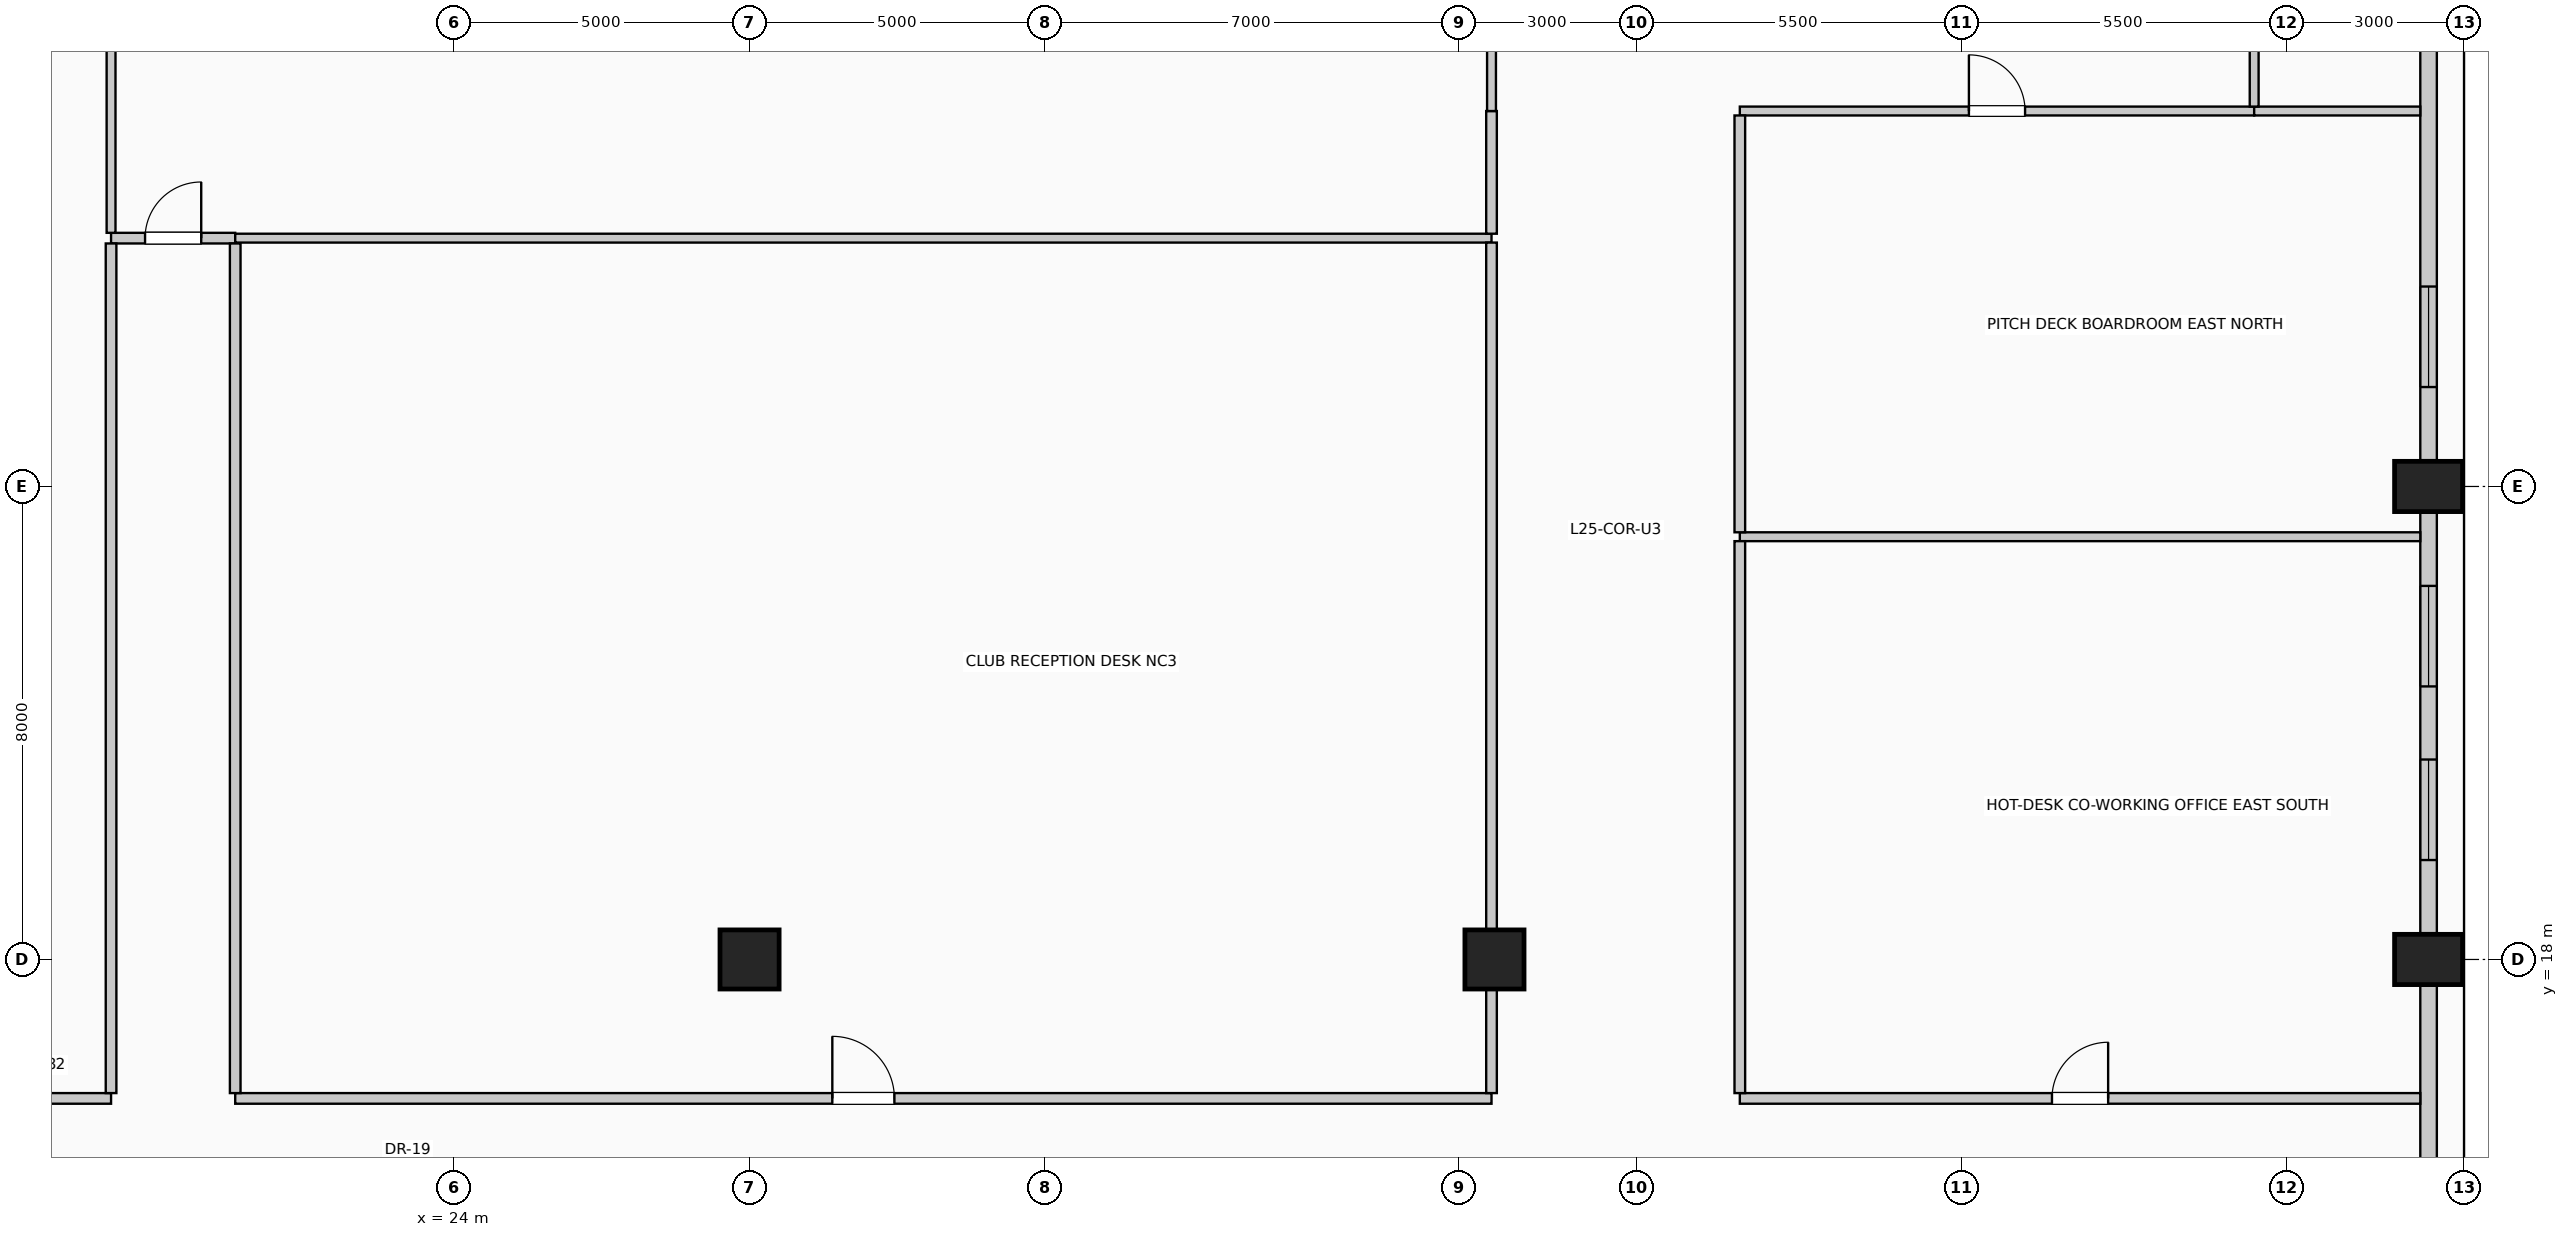
"""IFC4 building model, lengths in metres.
Left out: names, types, materials, properties, quantities, classifications, styles, units other than length and angle.
Written with IfcOpenShell. Run it as: python <this file> out.ifc"""

import sys

from ifc_helpers import new_model, si_unit, direction, frame, frame_2d, origin, origin_2d, place, context, subcontext, project, spatial, rectangle, circle, extrude, element, fill, save


model = new_model("IFC4")
c1 = context("Model", 3, precision=1e-05, world=origin(), true_north=direction((0.0, 1.0)))
c2 = subcontext(c1, "Body", "Model", "MODEL_VIEW")
j1 = project(units=[si_unit("LENGTHUNIT", "METRE"), si_unit("PLANEANGLEUNIT", "RADIAN")], contexts=[c1])
p1 = place(None, origin())
s1 = spatial("IfcSite", under=j1, at=p1, CompositionType="ELEMENT")
p2 = place(p1, origin())
s2 = spatial("IfcBuilding", under=s1, at=p2, CompositionType="ELEMENT")
p3 = place(p2, frame((0.0, 0.0, 104.6)))
s3 = spatial("IfcBuildingStorey", under=s2, at=p3, CompositionType="ELEMENT", Elevation=104.6)
for number, where, z_axis, x_axis in (
    (1, (57.4, 18.0, 0.0), (0.0, 0.0, 1.0), (0.0, 1.0, 0.0)),
    (2, (57.4, 26.0, 0.0), (0.0, 0.0, 1.0), (0.0, 1.0, 0.0)),
):
    element("IfcColumn", number, at=place(p3, frame(where, z_axis=z_axis, x_axis=x_axis)), inside=s3, PredefinedType="COLUMN", context=c2, shape_type="SweptSolid", body=[
        extrude(rectangle(XDim=0.85, YDim=1.15, at=origin_2d()), origin(), (0.0, 0.0, 1.0), 4.0),
    ])
for number, where, z_axis, x_axis in (
    (3, (29.0, 18.0, 0.0), (0.0, 0.0, 1.0), (1.0, 0.0, 0.0)),
    (4, (41.6, 18.0, 0.0), (0.0, 0.0, 1.0), (1.0, 0.0, 0.0)),
):
    element("IfcColumn", number, at=place(p3, frame(where, z_axis=z_axis, x_axis=x_axis)), inside=s3, PredefinedType="COLUMN", context=c2, shape_type="SweptSolid", body=[
        extrude(circle(Radius=0.5, at=origin_2d()), origin(), (0.0, 0.0, 1.0), 4.0),
    ])
p4 = place(p3, frame((57.4, 17.555, 0.0), z_axis=(0.0, 0.0, 1.0), x_axis=(0.0, -1.0, 0.0)))
e5 = element("IfcWall", 5, at=p4, inside=s3, PredefinedType="SOLIDWALL", context=c2, shape_type="SweptSolid", body=[
    extrude(rectangle(XDim=7.11, YDim=0.28, at=frame_2d((3.555, 0.0))), origin(), (0.0, 0.0, 1.0), 2.875),
])
p5 = place(p3, frame((57.4, 25.555, 0.0), z_axis=(0.0, 0.0, 1.0), x_axis=(0.0, -1.0, 0.0)))
e6 = element("IfcWall", 6, at=p5, inside=s3, PredefinedType="SOLIDWALL", context=c2, shape_type="SweptSolid", body=[
    extrude(rectangle(XDim=7.11, YDim=0.28, at=frame_2d((3.555, 0.0))), origin(), (0.0, 0.0, 1.0), 2.875),
])
p6 = place(p5, frame((1.237, 0.0, 0.5)))
e7 = element("IfcOpeningElement", 7, at=p6, cuts=e6, PredefinedType="OPENING", context=c2, shape_type="SweptSolid", body=[
    extrude(rectangle(XDim=1.7, YDim=1.95, at=frame_2d((0.85, 0.975))), frame((0.0, 0.15, 0.0), z_axis=(0.0, -1.0, 0.0), x_axis=(1.0, 0.0, 0.0)), (0.0, 0.0, 1.0), 0.3),
])
p7 = place(p5, frame((4.173, 0.0, 0.5)))
e8 = element("IfcOpeningElement", 8, at=p7, cuts=e6, PredefinedType="OPENING", context=c2, shape_type="SweptSolid", body=[
    extrude(rectangle(XDim=1.7, YDim=1.95, at=frame_2d((0.85, 0.975))), frame((0.0, 0.15, 0.0), z_axis=(0.0, -1.0, 0.0), x_axis=(1.0, 0.0, 0.0)), (0.0, 0.0, 1.0), 0.3),
])
p8 = place(p3, frame((57.4, 33.555, 0.0), z_axis=(0.0, 0.0, 1.0), x_axis=(0.0, -1.0, 0.0)))
e9 = element("IfcWall", 9, at=p8, inside=s3, PredefinedType="SOLIDWALL", context=c2, shape_type="SweptSolid", body=[
    extrude(rectangle(XDim=7.11, YDim=0.28, at=frame_2d((3.555, 0.0))), origin(), (0.0, 0.0, 1.0), 2.875),
])
p9 = place(p8, frame((4.173, 0.0, 0.5)))
e10 = element("IfcOpeningElement", 10, at=p9, cuts=e9, PredefinedType="OPENING", context=c2, shape_type="SweptSolid", body=[
    extrude(rectangle(XDim=1.7, YDim=1.95, at=frame_2d((0.85, 0.975))), frame((0.0, 0.15, 0.0), z_axis=(0.0, -1.0, 0.0), x_axis=(1.0, 0.0, 0.0)), (0.0, 0.0, 1.0), 0.3),
])
p10 = place(p3, frame((15.85, 15.65, 0.0), z_axis=(0.0, 0.0, 1.0), x_axis=(1.0, 0.0, 0.0)))
e11 = element("IfcWall", 11, at=p10, inside=s3, PredefinedType="PARTITIONING", context=c2, shape_type="SweptSolid", body=[
    extrude(rectangle(XDim=2.35, YDim=0.18, at=frame_2d((1.175, 0.0))), origin(), (0.0, 0.0, 1.0), 3.725),
])
p11 = place(p3, frame((20.3, 15.65, 0.0), z_axis=(0.0, 0.0, 1.0), x_axis=(1.0, 0.0, 0.0)))
e12 = element("IfcWall", 12, at=p11, inside=s3, PredefinedType="PARTITIONING", context=c2, shape_type="SweptSolid", body=[
    extrude(rectangle(XDim=21.25, YDim=0.18, at=frame_2d((10.625, 0.0))), origin(), (0.0, 0.0, 1.0), 3.725),
])
p12 = place(p11, frame((10.1, 0.0, 0.0)))
e13 = element("IfcOpeningElement", 13, at=p12, cuts=e12, PredefinedType="OPENING", context=c2, shape_type="SweptSolid", body=[
    extrude(rectangle(XDim=1.05, YDim=2.15, at=frame_2d((0.525, 1.075))), frame((0.0, 0.1, 0.0), z_axis=(0.0, -1.0, 0.0), x_axis=(1.0, 0.0, 0.0)), (0.0, 0.0, 1.0), 0.2),
])
p13 = place(p3, frame((45.75, 15.65, 0.0), z_axis=(0.0, 0.0, 1.0), x_axis=(1.0, 0.0, 0.0)))
e14 = element("IfcWall", 14, at=p13, inside=s3, PredefinedType="PARTITIONING", context=c2, shape_type="SweptSolid", body=[
    extrude(rectangle(XDim=11.51, YDim=0.18, at=frame_2d((5.755, 0.0))), origin(), (0.0, 0.0, 1.0), 3.725),
])
p14 = place(p13, frame((5.28, 0.0, 0.0)))
e15 = element("IfcOpeningElement", 15, at=p14, cuts=e14, PredefinedType="OPENING", context=c2, shape_type="SweptSolid", body=[
    extrude(rectangle(XDim=0.95, YDim=2.15, at=frame_2d((0.475, 1.075))), frame((0.0, 0.1, 0.0), z_axis=(0.0, -1.0, 0.0), x_axis=(1.0, 0.0, 0.0)), (0.0, 0.0, 1.0), 0.2),
])
p15 = place(p3, frame((45.75, 25.15, 0.0), z_axis=(0.0, 0.0, 1.0), x_axis=(1.0, 0.0, 0.0)))
e16 = element("IfcWall", 16, at=p15, inside=s3, PredefinedType="PARTITIONING", context=c2, shape_type="SweptSolid", body=[
    extrude(rectangle(XDim=11.51, YDim=0.15, at=frame_2d((5.755, 0.0))), origin(), (0.0, 0.0, 1.0), 3.17),
])
p16 = place(p3, frame((18.2, 30.2, 0.0), z_axis=(0.0, 0.0, 1.0), x_axis=(1.0, 0.0, 0.0)))
e17 = element("IfcWall", 17, at=p16, inside=s3, PredefinedType="PARTITIONING", context=c2, shape_type="SweptSolid", body=[
    extrude(rectangle(XDim=2.1, YDim=0.18, at=frame_2d((1.05, 0.0))), origin(), (0.0, 0.0, 1.0), 3.725),
])
p17 = place(p16, frame((0.575, 0.0, 0.0)))
e18 = element("IfcOpeningElement", 18, at=p17, cuts=e17, PredefinedType="OPENING", context=c2, shape_type="SweptSolid", body=[
    extrude(rectangle(XDim=0.95, YDim=2.15, at=frame_2d((0.475, 1.075))), frame((0.0, 0.1, 0.0), z_axis=(0.0, -1.0, 0.0), x_axis=(1.0, 0.0, 0.0)), (0.0, 0.0, 1.0), 0.2),
])
p18 = place(p3, frame((20.3, 30.2, 0.0), z_axis=(0.0, 0.0, 1.0), x_axis=(1.0, 0.0, 0.0)))
e19 = element("IfcWall", 19, at=p18, inside=s3, PredefinedType="PARTITIONING", context=c2, shape_type="SweptSolid", body=[
    extrude(rectangle(XDim=21.25, YDim=0.15, at=frame_2d((10.625, 0.0))), origin(), (0.0, 0.0, 1.0), 3.725),
])
p19 = place(p3, frame((45.75, 32.35, 0.0), z_axis=(0.0, 0.0, 1.0), x_axis=(1.0, 0.0, 0.0)))
e20 = element("IfcWall", 20, at=p19, inside=s3, PredefinedType="PARTITIONING", context=c2, shape_type="SweptSolid", body=[
    extrude(rectangle(XDim=8.7, YDim=0.15, at=frame_2d((4.35, 0.0))), origin(), (0.0, 0.0, 1.0), 3.725),
])
p20 = place(p19, frame((3.875, 0.0, 0.0)))
e21 = element("IfcOpeningElement", 21, at=p20, cuts=e20, PredefinedType="OPENING", context=c2, shape_type="SweptSolid", body=[
    extrude(rectangle(XDim=0.95, YDim=2.15, at=frame_2d((0.475, 1.075))), frame((0.0, 0.085, 0.0), z_axis=(0.0, -1.0, 0.0), x_axis=(1.0, 0.0, 0.0)), (0.0, 0.0, 1.0), 0.17),
])
p21 = place(p3, frame((54.45, 32.35, 0.0), z_axis=(0.0, 0.0, 1.0), x_axis=(1.0, 0.0, 0.0)))
e22 = element("IfcWall", 22, at=p21, inside=s3, PredefinedType="PARTITIONING", context=c2, shape_type="SweptSolid", body=[
    extrude(rectangle(XDim=2.81, YDim=0.15, at=frame_2d((1.405, 0.0))), origin(), (0.0, 0.0, 1.0), 3.725),
])
p22 = place(p3, frame((18.2, 15.74, 0.0), z_axis=(0.0, 0.0, 1.0), x_axis=(0.0, 1.0, 0.0)))
e23 = element("IfcWall", 23, at=p22, inside=s3, PredefinedType="PARTITIONING", context=c2, shape_type="SweptSolid", body=[
    extrude(rectangle(XDim=14.37, YDim=0.18, at=frame_2d((7.185, 0.0))), origin(), (0.0, 0.0, 1.0), 3.725),
])
p23 = place(p3, frame((18.2, 30.29, 0.0), z_axis=(0.0, 0.0, 1.0), x_axis=(0.0, 1.0, 0.0)))
e24 = element("IfcWall", 24, at=p23, inside=s3, PredefinedType="PARTITIONING", context=c2, shape_type="SweptSolid", body=[
    extrude(rectangle(XDim=14.97, YDim=0.15, at=frame_2d((7.485, 0.0))), origin(), (0.0, 0.0, 1.0), 3.725),
])
p24 = place(p3, frame((20.3, 15.74, 0.0), z_axis=(0.0, 0.0, 1.0), x_axis=(0.0, 1.0, 0.0)))
e25 = element("IfcWall", 25, at=p24, inside=s3, PredefinedType="PARTITIONING", context=c2, shape_type="SweptSolid", body=[
    extrude(rectangle(XDim=14.37, YDim=0.18, at=frame_2d((7.185, 0.0))), origin(), (0.0, 0.0, 1.0), 3.725),
])
p25 = place(p3, frame((41.55, 15.74, 0.0), z_axis=(0.0, 0.0, 1.0), x_axis=(0.0, 1.0, 0.0)))
e26 = element("IfcWall", 26, at=p25, inside=s3, PredefinedType="PARTITIONING", context=c2, shape_type="SweptSolid", body=[
    extrude(rectangle(XDim=1.76, YDim=0.18, at=frame_2d((0.88, 0.0))), origin(), (0.0, 0.0, 1.0), 3.07),
])
p26 = place(p3, frame((41.55, 18.5, 0.0), z_axis=(0.0, 0.0, 1.0), x_axis=(0.0, 1.0, 0.0)))
e27 = element("IfcWall", 27, at=p26, inside=s3, PredefinedType="PARTITIONING", context=c2, shape_type="SweptSolid", body=[
    extrude(rectangle(XDim=11.625, YDim=0.18, at=frame_2d((5.812, 0.0))), origin(), (0.0, 0.0, 1.0), 3.07),
])
p27 = place(p3, frame((41.55, 30.275, 0.0), z_axis=(0.0, 0.0, 1.0), x_axis=(0.0, 1.0, 0.0)))
e28 = element("IfcWall", 28, at=p27, inside=s3, PredefinedType="PARTITIONING", context=c2, shape_type="SweptSolid", body=[
    extrude(rectangle(XDim=2.075, YDim=0.18, at=frame_2d((1.038, 0.0))), origin(), (0.0, 0.0, 1.0), 3.07),
])
p28 = place(p3, frame((41.55, 32.35, 0.0), z_axis=(0.0, 0.0, 1.0), x_axis=(0.0, 1.0, 0.0)))
e29 = element("IfcWall", 29, at=p28, inside=s3, PredefinedType="PARTITIONING", context=c2, shape_type="SweptSolid", body=[
    extrude(rectangle(XDim=1.15, YDim=0.15, at=frame_2d((0.575, 0.0))), origin(), (0.0, 0.0, 1.0), 3.07),
])
p29 = place(p3, frame((45.75, 15.74, 0.0), z_axis=(0.0, 0.0, 1.0), x_axis=(0.0, 1.0, 0.0)))
e30 = element("IfcWall", 30, at=p29, inside=s3, PredefinedType="PARTITIONING", context=c2, shape_type="SweptSolid", body=[
    extrude(rectangle(XDim=9.335, YDim=0.18, at=frame_2d((4.667, 0.0))), origin(), (0.0, 0.0, 1.0), 3.725),
])
p30 = place(p3, frame((45.75, 25.225, 0.0), z_axis=(0.0, 0.0, 1.0), x_axis=(0.0, 1.0, 0.0)))
e31 = element("IfcWall", 31, at=p30, inside=s3, PredefinedType="PARTITIONING", context=c2, shape_type="SweptSolid", body=[
    extrude(rectangle(XDim=7.05, YDim=0.18, at=frame_2d((3.525, 0.0))), origin(), (0.0, 0.0, 1.0), 3.725),
])
p31 = place(p3, frame((54.45, 32.425, 0.0), z_axis=(0.0, 0.0, 1.0), x_axis=(0.0, 1.0, 0.0)))
e32 = element("IfcWall", 32, at=p31, inside=s3, PredefinedType="PARTITIONING", context=c2, shape_type="SweptSolid", body=[
    extrude(rectangle(XDim=1.725, YDim=0.15, at=frame_2d((0.862, 0.0))), origin(), (0.0, 0.0, 1.0), 3.725),
])
p32 = place(p6, origin())
e33 = element("IfcWindow", 33, at=p32, inside=s3, PartitioningType="SINGLE_PANEL", PredefinedType="WINDOW", context=c2, shape_type="SweptSolid", body=[
    extrude(rectangle(XDim=1.7, YDim=1.95, at=frame_2d((0.85, 0.975))), frame((0.0, 0.03, 0.0), z_axis=(0.0, -1.0, 0.0), x_axis=(1.0, 0.0, 0.0)), (0.0, 0.0, 1.0), 0.06),
])
fill(e7, e33)
p33 = place(p7, origin())
e34 = element("IfcWindow", 34, at=p33, inside=s3, PartitioningType="SINGLE_PANEL", PredefinedType="WINDOW", context=c2, shape_type="SweptSolid", body=[
    extrude(rectangle(XDim=1.7, YDim=1.95, at=frame_2d((0.85, 0.975))), frame((0.0, 0.03, 0.0), z_axis=(0.0, -1.0, 0.0), x_axis=(1.0, 0.0, 0.0)), (0.0, 0.0, 1.0), 0.06),
])
fill(e8, e34)
p34 = place(p9, origin())
e35 = element("IfcWindow", 35, at=p34, inside=s3, PartitioningType="SINGLE_PANEL", PredefinedType="WINDOW", context=c2, shape_type="SweptSolid", body=[
    extrude(rectangle(XDim=1.7, YDim=1.95, at=frame_2d((0.85, 0.975))), frame((0.0, 0.03, 0.0), z_axis=(0.0, -1.0, 0.0), x_axis=(1.0, 0.0, 0.0)), (0.0, 0.0, 1.0), 0.06),
])
fill(e10, e35)
p35 = place(p12, origin())
e36 = element("IfcDoor", 36, at=p35, inside=s3, OperationType="SINGLE_SWING_LEFT", PredefinedType="DOOR", context=c2, shape_type="SweptSolid", body=[
    extrude(rectangle(XDim=1.05, YDim=2.15, at=frame_2d((0.525, 1.075))), frame((0.0, 0.025, 0.0), z_axis=(0.0, -1.0, 0.0), x_axis=(1.0, 0.0, 0.0)), (0.0, 0.0, 1.0), 0.05),
])
fill(e13, e36)
p36 = place(p14, origin())
e37 = element("IfcDoor", 37, at=p36, inside=s3, OperationType="SINGLE_SWING_RIGHT", PredefinedType="DOOR", context=c2, shape_type="SweptSolid", body=[
    extrude(rectangle(XDim=0.95, YDim=2.15, at=frame_2d((0.475, 1.075))), frame((0.0, 0.025, 0.0), z_axis=(0.0, -1.0, 0.0), x_axis=(1.0, 0.0, 0.0)), (0.0, 0.0, 1.0), 0.05),
])
fill(e15, e37)
p37 = place(p17, origin())
e38 = element("IfcDoor", 38, at=p37, inside=s3, OperationType="SINGLE_SWING_RIGHT", PredefinedType="DOOR", context=c2, shape_type="SweptSolid", body=[
    extrude(rectangle(XDim=0.95, YDim=2.15, at=frame_2d((0.475, 1.075))), frame((0.0, 0.025, 0.0), z_axis=(0.0, -1.0, 0.0), x_axis=(1.0, 0.0, 0.0)), (0.0, 0.0, 1.0), 0.05),
])
fill(e18, e38)
p38 = place(p20, origin())
e39 = element("IfcDoor", 39, at=p38, inside=s3, OperationType="SINGLE_SWING_LEFT", PredefinedType="DOOR", context=c2, shape_type="SweptSolid", body=[
    extrude(rectangle(XDim=0.95, YDim=2.15, at=frame_2d((0.475, 1.075))), frame((0.0, 0.025, 0.0), z_axis=(0.0, -1.0, 0.0), x_axis=(1.0, 0.0, 0.0)), (0.0, 0.0, 1.0), 0.05),
])
fill(e21, e39)
save(model, sys.argv[1])
